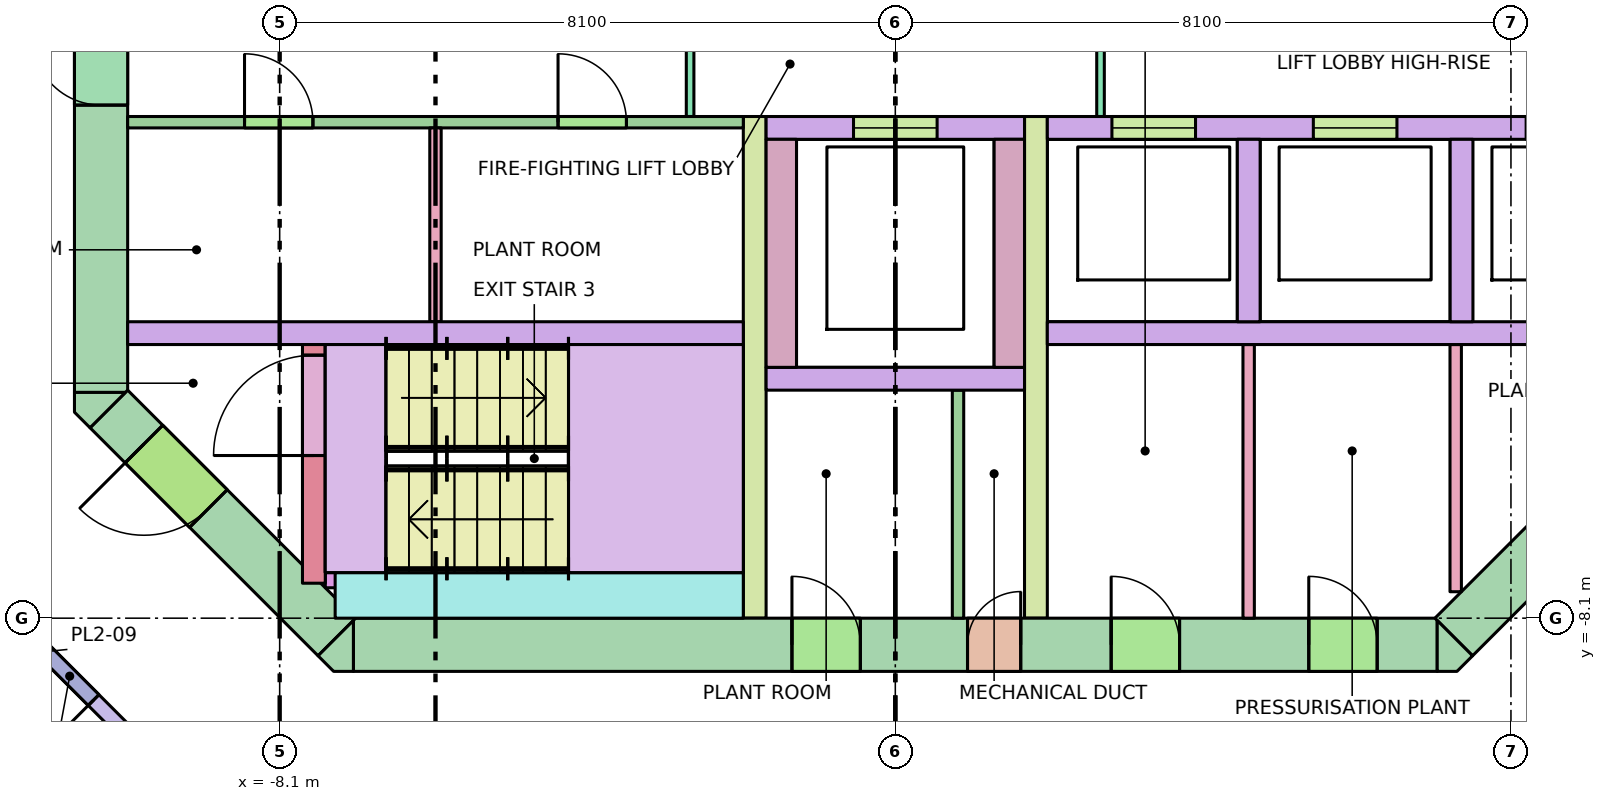
"""IFC4 building model, lengths in metres.
Left out: names, types, materials, properties, quantities, classifications, styles, units other than length and angle.
Written with IfcOpenShell. Run it as: python <this file> out.ifc"""

import sys

from ifc_helpers import new_model, si_unit, direction, frame, frame_2d, origin, place, context, subcontext, project, spatial, polyline, rectangle, outline, extrude, element, fill, save


model = new_model("IFC4")
c1 = context("Model", 3, precision=1e-05, world=origin(), true_north=direction((0.0, 1.0)))
c2 = subcontext(c1, "Body", "Model", "MODEL_VIEW")
j1 = project(units=[si_unit("LENGTHUNIT", "METRE"), si_unit("PLANEANGLEUNIT", "RADIAN")], contexts=[c1])
p1 = place(None, origin())
s1 = spatial("IfcSite", under=j1, at=p1, CompositionType="ELEMENT")
p2 = place(p1, origin())
s2 = spatial("IfcBuilding", under=s1, at=p2, CompositionType="ELEMENT")
p3 = place(p2, frame((0.0, 0.0, 183.8)))
s3 = spatial("IfcBuildingStorey", under=s2, at=p3, CompositionType="ELEMENT", Elevation=183.8)
p4 = place(p3, frame((-7.13, -8.45, -0.28), z_axis=(0.0, 0.0, 1.0), x_axis=(1.0, 0.0, 0.0)))
e1 = element("IfcWall", 1, at=p4, inside=s3, PredefinedType="SHEAR", context=c2, shape_type="SweptSolid", body=[
    extrude(rectangle(XDim=14.26, YDim=0.7, at=frame_2d((7.13, 0.0))), origin(), (0.0, 0.0, 1.0), 9.0),
])
p5 = place(p4, frame((8.08, 0.0, 0.28)))
e2 = element("IfcOpeningElement", 2, at=p5, cuts=e1, PredefinedType="OPENING", context=c2, shape_type="SweptSolid", body=[
    extrude(rectangle(XDim=0.7, YDim=2.1, at=frame_2d((0.35, 1.05))), frame((0.0, 0.36, 0.0), z_axis=(0.0, -1.0, 0.0), x_axis=(1.0, 0.0, 0.0)), (0.0, 0.0, 1.0), 0.72),
])
p6 = place(p4, frame((5.77, 0.0, 0.28)))
e3 = element("IfcOpeningElement", 3, at=p6, cuts=e1, PredefinedType="OPENING", context=c2, shape_type="SweptSolid", body=[
    extrude(rectangle(XDim=0.9, YDim=2.1, at=frame_2d((0.45, 1.05))), frame((0.0, 0.36, 0.0), z_axis=(0.0, -1.0, 0.0), x_axis=(1.0, 0.0, 0.0)), (0.0, 0.0, 1.0), 0.72),
])
p7 = place(p4, frame((9.97, 0.0, 0.28)))
e4 = element("IfcOpeningElement", 4, at=p7, cuts=e1, PredefinedType="OPENING", context=c2, shape_type="SweptSolid", body=[
    extrude(rectangle(XDim=0.9, YDim=2.1, at=frame_2d((0.45, 1.05))), frame((0.0, 0.36, 0.0), z_axis=(0.0, -1.0, 0.0), x_axis=(1.0, 0.0, 0.0)), (0.0, 0.0, 1.0), 0.72),
])
p8 = place(p4, frame((12.57, 0.0, 0.28)))
e5 = element("IfcOpeningElement", 5, at=p8, cuts=e1, PredefinedType="OPENING", context=c2, shape_type="SweptSolid", body=[
    extrude(rectangle(XDim=0.9, YDim=2.1, at=frame_2d((0.45, 1.05))), frame((0.0, 0.36, 0.0), z_axis=(0.0, -1.0, 0.0), x_axis=(1.0, 0.0, 0.0)), (0.0, 0.0, 1.0), 0.72),
])
p9 = place(p3, frame((-10.45, -5.13, -0.28), z_axis=(0.0, 0.0, 1.0), x_axis=(0.0, 1.0, 0.0)))
e6 = element("IfcWall", 6, at=p9, inside=s3, PredefinedType="SHEAR", context=c2, shape_type="SweptSolid", body=[
    extrude(rectangle(XDim=10.26, YDim=0.7, at=frame_2d((5.13, 0.0))), origin(), (0.0, 0.0, 1.0), 9.0),
])
p10 = place(p9, frame((5.58, 0.0, 0.28)))
e7 = element("IfcOpeningElement", 7, at=p10, cuts=e6, PredefinedType="OPENING", context=c2, shape_type="SweptSolid", body=[
    extrude(rectangle(XDim=0.9, YDim=2.1, at=frame_2d((0.45, 1.05))), frame((0.0, 0.36, 0.0), z_axis=(0.0, -1.0, 0.0), x_axis=(1.0, 0.0, 0.0)), (0.0, 0.0, 1.0), 0.72),
])
p11 = place(p9, frame((3.78, 0.0, 0.28)))
e8 = element("IfcOpeningElement", 8, at=p11, cuts=e6, PredefinedType="OPENING", context=c2, shape_type="SweptSolid", body=[
    extrude(rectangle(XDim=0.9, YDim=2.1, at=frame_2d((0.45, 1.05))), frame((0.0, 0.36, 0.0), z_axis=(0.0, -1.0, 0.0), x_axis=(1.0, 0.0, 0.0)), (0.0, 0.0, 1.0), 0.72),
])
p12 = place(p3, frame((10.347, -5.347, -0.28), z_axis=(0.0, 0.0, 1.0), x_axis=(-0.707106781187, -0.707106781187, 0.0)))
e9 = element("IfcWall", 9, at=p12, inside=s3, PredefinedType="SHEAR", context=c2, shape_type="SweptSolid", body=[
    extrude(rectangle(XDim=4.243, YDim=0.7, at=frame_2d((2.121, 0.0))), origin(), (0.0, 0.0, 1.0), 9.0),
])
p13 = place(p12, frame((0.52, 0.0, 0.28)))
e10 = element("IfcOpeningElement", 10, at=p13, cuts=e9, PredefinedType="OPENING", context=c2, shape_type="SweptSolid", body=[
    extrude(rectangle(XDim=0.9, YDim=2.1, at=frame_2d((0.45, 1.05))), frame((0.0, 0.36, 0.0), z_axis=(0.0, -1.0, 0.0), x_axis=(1.0, 0.0, 0.0)), (0.0, 0.0, 1.0), 0.72),
])
p14 = place(p3, frame((-7.347, -8.347, -0.28), z_axis=(0.0, 0.0, 1.0), x_axis=(-0.707106781187, 0.707106781187, 0.0)))
e11 = element("IfcWall", 11, at=p14, inside=s3, PredefinedType="SHEAR", context=c2, shape_type="SweptSolid", body=[
    extrude(rectangle(XDim=4.243, YDim=0.7, at=frame_2d((2.121, 0.0))), origin(), (0.0, 0.0, 1.0), 9.0),
])
p15 = place(p14, frame((2.39, 0.0, 0.28)))
e12 = element("IfcOpeningElement", 12, at=p15, cuts=e11, PredefinedType="OPENING", context=c2, shape_type="SweptSolid", body=[
    extrude(rectangle(XDim=1.2, YDim=2.1, at=frame_2d((0.6, 1.05))), frame((0.0, 0.36, 0.0), z_axis=(0.0, -1.0, 0.0), x_axis=(1.0, 0.0, 0.0)), (0.0, 0.0, 1.0), 0.72),
])
p16 = place(p3, frame((0.0, 0.0, -0.28)))
e13 = element("IfcWall", 13, at=p16, inside=s3, PredefinedType="SHEAR", context=c2, shape_type="SweptSolid", body=[
    extrude(outline(polyline([(-7.39, -8.8), (-7.595, -8.595), (-7.595, -8.595), (-7.595, -8.595), (-7.13, -8.13), (-7.13, -8.8), (-7.13, -8.8), (-7.39, -8.8)])), origin(), (0.0, 0.0, 1.0), 9.0),
])
p17 = place(p3, frame((0.0, 0.0, -0.28)))
e14 = element("IfcWall", 14, at=p17, inside=s3, PredefinedType="SHEAR", context=c2, shape_type="SweptSolid", body=[
    extrude(outline(polyline([(7.39, -8.8), (7.13, -8.8), (7.13, -8.8), (7.13, -8.13), (7.595, -8.595), (7.595, -8.595), (7.595, -8.595), (7.39, -8.8)])), origin(), (0.0, 0.0, 1.0), 9.0),
])
p18 = place(p3, frame((0.0, 0.0, -0.28)))
e15 = element("IfcWall", 15, at=p18, inside=s3, PredefinedType="SHEAR", context=c2, shape_type="SweptSolid", body=[
    extrude(outline(polyline([(-10.8, -5.39), (-10.8, -5.13), (-10.8, -5.13), (-10.13, -5.13), (-10.595, -5.595), (-10.595, -5.595), (-10.595, -5.595), (-10.8, -5.39)])), origin(), (0.0, 0.0, 1.0), 9.0),
])
for number, where, z_axis, x_axis in (
    (16, (-10.1, -4.35, 0.0), (0.0, 0.0, 1.0), (1.0, 0.0, 0.0)),
    (17, (2.0, -4.35, 0.0), (0.0, 0.0, 1.0), (1.0, 0.0, 0.0)),
):
    element("IfcWall", number, at=place(p3, frame(where, z_axis=z_axis, x_axis=x_axis)), inside=s3, PredefinedType="SOLIDWALL", context=c2, shape_type="SweptSolid", body=[
        extrude(rectangle(XDim=8.1, YDim=0.3, at=frame_2d((4.05, 0.0))), origin(), (0.0, 0.0, 1.0), 8.72),
    ])
p19 = place(p3, frame((2.0, -1.65, 0.0), z_axis=(0.0, 0.0, 1.0), x_axis=(1.0, 0.0, 0.0)))
e18 = element("IfcWall", 18, at=p19, inside=s3, PredefinedType="SOLIDWALL", context=c2, shape_type="SweptSolid", body=[
    extrude(rectangle(XDim=8.1, YDim=0.3, at=frame_2d((4.05, 0.0))), origin(), (0.0, 0.0, 1.0), 8.72),
])
p20 = place(p19, frame((0.85, 0.0, 0.0)))
e19 = element("IfcOpeningElement", 19, at=p20, cuts=e18, PredefinedType="OPENING", context=c2, shape_type="SweptSolid", body=[
    extrude(rectangle(XDim=1.1, YDim=2.1, at=frame_2d((0.55, 1.05))), frame((0.0, 0.16, 0.0), z_axis=(0.0, -1.0, 0.0), x_axis=(1.0, 0.0, 0.0)), (0.0, 0.0, 1.0), 0.32),
])
p21 = place(p19, frame((3.5, 0.0, 0.0)))
e20 = element("IfcOpeningElement", 20, at=p21, cuts=e18, PredefinedType="OPENING", context=c2, shape_type="SweptSolid", body=[
    extrude(rectangle(XDim=1.1, YDim=2.1, at=frame_2d((0.55, 1.05))), frame((0.0, 0.16, 0.0), z_axis=(0.0, -1.0, 0.0), x_axis=(1.0, 0.0, 0.0)), (0.0, 0.0, 1.0), 0.32),
])
p22 = place(p19, frame((6.3, 0.0, 0.0)))
e21 = element("IfcOpeningElement", 21, at=p22, cuts=e18, PredefinedType="OPENING", context=c2, shape_type="SweptSolid", body=[
    extrude(rectangle(XDim=1.1, YDim=2.1, at=frame_2d((0.55, 1.05))), frame((0.0, 0.16, 0.0), z_axis=(0.0, -1.0, 0.0), x_axis=(1.0, 0.0, 0.0)), (0.0, 0.0, 1.0), 0.32),
])
for number, where, z_axis, x_axis in (
    (22, (4.65, -4.2, 0.0), (0.0, 0.0, 1.0), (0.0, 1.0, 0.0)),
    (23, (7.45, -4.2, 0.0), (0.0, 0.0, 1.0), (0.0, 1.0, 0.0)),
):
    element("IfcWall", number, at=place(p3, frame(where, z_axis=z_axis, x_axis=x_axis)), inside=s3, PredefinedType="SOLIDWALL", context=c2, shape_type="SweptSolid", body=[
        extrude(rectangle(XDim=2.4, YDim=0.3, at=frame_2d((1.2, 0.0))), origin(), (0.0, 0.0, 1.0), 8.72),
    ])
for number, where, z_axis, x_axis in (
    (24, (-1.85, -8.1, 0.0), (0.0, 0.0, 1.0), (0.0, 1.0, 0.0)),
    (25, (1.85, -8.1, 0.0), (0.0, 0.0, 1.0), (0.0, 1.0, 0.0)),
):
    element("IfcWall", number, at=place(p3, frame(where, z_axis=z_axis, x_axis=x_axis)), inside=s3, PredefinedType="SHEAR", context=c2, shape_type="SweptSolid", body=[
        extrude(rectangle(XDim=6.6, YDim=0.3, at=frame_2d((3.3, 0.0))), origin(), (0.0, 0.0, 1.0), 8.72),
    ])
p23 = place(p3, frame((-1.7, -1.65, 0.0), z_axis=(0.0, 0.0, 1.0), x_axis=(1.0, 0.0, 0.0)))
e26 = element("IfcWall", 26, at=p23, inside=s3, PredefinedType="SOLIDWALL", context=c2, shape_type="SweptSolid", body=[
    extrude(rectangle(XDim=3.4, YDim=0.3, at=frame_2d((1.7, 0.0))), origin(), (0.0, 0.0, 1.0), 8.72),
])
p24 = place(p23, frame((1.15, 0.0, 0.0)))
e27 = element("IfcOpeningElement", 27, at=p24, cuts=e26, PredefinedType="OPENING", context=c2, shape_type="SweptSolid", body=[
    extrude(rectangle(XDim=1.1, YDim=2.1, at=frame_2d((0.55, 1.05))), frame((0.0, 0.16, 0.0), z_axis=(0.0, -1.0, 0.0), x_axis=(1.0, 0.0, 0.0)), (0.0, 0.0, 1.0), 0.32),
])
for number, where, z_axis, x_axis in (
    (28, (-1.5, -4.8, 0.0), (0.0, 0.0, 1.0), (0.0, 1.0, 0.0)),
    (29, (1.5, -4.8, 0.0), (0.0, 0.0, 1.0), (0.0, 1.0, 0.0)),
):
    element("IfcWall", number, at=place(p3, frame(where, z_axis=z_axis, x_axis=x_axis)), inside=s3, PredefinedType="SOLIDWALL", context=c2, shape_type="SweptSolid", body=[
        extrude(rectangle(XDim=3.0, YDim=0.4, at=frame_2d((1.5, 0.0))), origin(), (0.0, 0.0, 1.0), 8.72),
    ])
p25 = place(p3, frame((-1.7, -4.95, 0.0), z_axis=(0.0, 0.0, 1.0), x_axis=(1.0, 0.0, 0.0)))
e30 = element("IfcWall", 30, at=p25, inside=s3, PredefinedType="SOLIDWALL", context=c2, shape_type="SweptSolid", body=[
    extrude(rectangle(XDim=3.4, YDim=0.3, at=frame_2d((1.7, 0.0))), origin(), (0.0, 0.0, 1.0), 8.72),
])
p26 = place(p3, frame((-7.65, -7.64, 0.0), z_axis=(0.0, 0.0, 1.0), x_axis=(0.0, 1.0, 0.0)))
e31 = element("IfcWall", 31, at=p26, inside=s3, PredefinedType="SHEAR", context=c2, shape_type="SweptSolid", body=[
    extrude(rectangle(XDim=3.14, YDim=0.3, at=frame_2d((1.57, 0.0))), origin(), (0.0, 0.0, 1.0), 8.72),
])
p27 = place(p26, frame((1.68, 0.0, 0.0)))
e32 = element("IfcOpeningElement", 32, at=p27, cuts=e31, PredefinedType="OPENING", context=c2, shape_type="SweptSolid", body=[
    extrude(rectangle(XDim=1.32, YDim=2.1, at=frame_2d((0.66, 1.05))), frame((0.0, 0.16, 0.0), z_axis=(0.0, -1.0, 0.0), x_axis=(1.0, 0.0, 0.0)), (0.0, 0.0, 1.0), 0.32),
])
p28 = place(p3, frame((-7.5, -7.6, 0.0), z_axis=(0.0, 0.0, 1.0), x_axis=(1.0, 0.0, 0.0)))
e33 = element("IfcWall", 33, at=p28, inside=s3, PredefinedType="SHEAR", context=c2, shape_type="SweptSolid", body=[
    extrude(rectangle(XDim=0.6, YDim=0.2, at=frame_2d((0.3, 0.0))), origin(), (0.0, 0.0, 1.0), 8.72),
])
p29 = place(p3, frame((-7.37, -7.8, 0.0), z_axis=(0.0, 0.0, 1.0), x_axis=(1.0, 0.0, 0.0)))
e34 = element("IfcWall", 34, at=p29, inside=s3, PredefinedType="SHEAR", context=c2, shape_type="SweptSolid", body=[
    extrude(rectangle(XDim=5.37, YDim=0.6, at=frame_2d((2.685, 0.0))), origin(), (0.0, 0.0, 1.0), 8.72),
])
p30 = place(p3, frame((-2.7, -1.5, 0.0), z_axis=(0.0, 0.0, 1.0), x_axis=(0.0, 1.0, 0.0)))
e35 = element("IfcWall", 35, at=p30, inside=s3, PredefinedType="PARTITIONING", context=c2, shape_type="SweptSolid", body=[
    extrude(rectangle(XDim=3.0, YDim=0.1, at=frame_2d((1.5, 0.0))), origin(), (0.0, 0.0, 1.0), 8.72),
])
p31 = place(p30, frame((0.9, 0.0, 0.0)))
e36 = element("IfcOpeningElement", 36, at=p31, cuts=e35, PredefinedType="OPENING", context=c2, shape_type="SweptSolid", body=[
    extrude(rectangle(XDim=1.2, YDim=2.1, at=frame_2d((0.6, 1.05))), frame((0.0, 0.06, 0.0), z_axis=(0.0, -1.0, 0.0), x_axis=(1.0, 0.0, 0.0)), (0.0, 0.0, 1.0), 0.12),
])
p32 = place(p3, frame((2.7, -1.5, 0.0), z_axis=(0.0, 0.0, 1.0), x_axis=(0.0, 1.0, 0.0)))
e37 = element("IfcWall", 37, at=p32, inside=s3, PredefinedType="PARTITIONING", context=c2, shape_type="SweptSolid", body=[
    extrude(rectangle(XDim=3.0, YDim=0.1, at=frame_2d((1.5, 0.0))), origin(), (0.0, 0.0, 1.0), 8.72),
])
p33 = place(p32, frame((0.9, 0.0, 0.0)))
e38 = element("IfcOpeningElement", 38, at=p33, cuts=e37, PredefinedType="OPENING", context=c2, shape_type="SweptSolid", body=[
    extrude(rectangle(XDim=1.2, YDim=2.1, at=frame_2d((0.6, 1.05))), frame((0.0, 0.06, 0.0), z_axis=(0.0, -1.0, 0.0), x_axis=(1.0, 0.0, 0.0)), (0.0, 0.0, 1.0), 0.12),
])
p34 = place(p3, frame((0.825, -8.1, 0.0), z_axis=(0.0, 0.0, 1.0), x_axis=(0.0, 1.0, 0.0)))
e39 = element("IfcWall", 39, at=p34, inside=s3, PredefinedType="PARTITIONING", context=c2, shape_type="SweptSolid", body=[
    extrude(rectangle(XDim=3.0, YDim=0.15, at=frame_2d((1.5, 0.0))), origin(), (0.0, 0.0, 1.0), 8.72),
])
p35 = place(p3, frame((4.649, -8.1, 0.0), z_axis=(0.0, 0.0, 1.0), x_axis=(0.0, 1.0, 0.0)))
e40 = element("IfcWall", 40, at=p35, inside=s3, PredefinedType="PARTITIONING", context=c2, shape_type="SweptSolid", body=[
    extrude(rectangle(XDim=3.6, YDim=0.15, at=frame_2d((1.8, 0.0))), origin(), (0.0, 0.0, 1.0), 8.72),
])
p36 = place(p3, frame((7.373, -7.752, 0.0), z_axis=(0.0, 0.0, 1.0), x_axis=(0.0, 1.0, 0.0)))
e41 = element("IfcWall", 41, at=p36, inside=s3, PredefinedType="PARTITIONING", context=c2, shape_type="SweptSolid", body=[
    extrude(rectangle(XDim=3.252, YDim=0.15, at=frame_2d((1.626, 0.0))), origin(), (0.0, 0.0, 1.0), 8.72),
])
p37 = place(p3, frame((-6.05, -4.2, 0.0), z_axis=(0.0, 0.0, 1.0), x_axis=(0.0, 1.0, 0.0)))
e42 = element("IfcWall", 42, at=p37, inside=s3, PredefinedType="PARTITIONING", context=c2, shape_type="SweptSolid", body=[
    extrude(rectangle(XDim=2.55, YDim=0.15, at=frame_2d((1.275, 0.0))), origin(), (0.0, 0.0, 1.0), 8.72),
])
p38 = place(p3, frame((-10.1, -1.575, 0.0), z_axis=(0.0, 0.0, 1.0), x_axis=(1.0, 0.0, 0.0)))
e43 = element("IfcWall", 43, at=p38, inside=s3, PredefinedType="PARTITIONING", context=c2, shape_type="SweptSolid", body=[
    extrude(rectangle(XDim=8.1, YDim=0.15, at=frame_2d((4.05, 0.0))), origin(), (0.0, 0.0, 1.0), 8.72),
])
p39 = place(p38, frame((1.538, 0.0, 0.0)))
e44 = element("IfcOpeningElement", 44, at=p39, cuts=e43, PredefinedType="OPENING", context=c2, shape_type="SweptSolid", body=[
    extrude(rectangle(XDim=0.9, YDim=2.1, at=frame_2d((0.45, 1.05))), frame((0.0, 0.085, 0.0), z_axis=(0.0, -1.0, 0.0), x_axis=(1.0, 0.0, 0.0)), (0.0, 0.0, 1.0), 0.17),
])
p40 = place(p38, frame((5.663, 0.0, 0.0)))
e45 = element("IfcOpeningElement", 45, at=p40, cuts=e43, PredefinedType="OPENING", context=c2, shape_type="SweptSolid", body=[
    extrude(rectangle(XDim=0.9, YDim=2.1, at=frame_2d((0.45, 1.05))), frame((0.0, 0.085, 0.0), z_axis=(0.0, -1.0, 0.0), x_axis=(1.0, 0.0, 0.0)), (0.0, 0.0, 1.0), 0.17),
])
p41 = place(p3, frame((-8.475, -11.25, 0.0), z_axis=(0.0, 0.0, 1.0), x_axis=(-0.707106781187, 0.707106781187, 0.0)))
e46 = element("IfcWall", 46, at=p41, inside=s3, PredefinedType="PARTITIONING", context=c2, shape_type="SweptSolid", body=[
    extrude(rectangle(XDim=6.753, YDim=0.2, at=frame_2d((3.377, 0.0))), origin(), (0.0, 0.0, 1.0), 7.92),
])
p42 = place(p41, frame((2.932, 0.0, 0.0)))
e47 = element("IfcOpeningElement", 47, at=p42, cuts=e46, PredefinedType="OPENING", context=c2, shape_type="SweptSolid", body=[
    extrude(rectangle(XDim=1.8, YDim=2.1, at=frame_2d((0.9, 1.05))), frame((0.0, 0.11, 0.0), z_axis=(0.0, -1.0, 0.0), x_axis=(1.0, 0.0, 0.0)), (0.0, 0.0, 1.0), 0.22),
])
p43 = place(p20, origin())
e48 = element("IfcDoor", 48, at=p43, inside=s3, OperationType="DOUBLE_DOOR_SLIDING", PredefinedType="DOOR", context=c2, shape_type="SweptSolid", body=[
    extrude(rectangle(XDim=1.1, YDim=2.1, at=frame_2d((0.55, 1.05))), frame((0.0, 0.025, 0.0), z_axis=(0.0, -1.0, 0.0), x_axis=(1.0, 0.0, 0.0)), (0.0, 0.0, 1.0), 0.05),
])
fill(e19, e48)
p44 = place(p21, origin())
e49 = element("IfcDoor", 49, at=p44, inside=s3, OperationType="DOUBLE_DOOR_SLIDING", PredefinedType="DOOR", context=c2, shape_type="SweptSolid", body=[
    extrude(rectangle(XDim=1.1, YDim=2.1, at=frame_2d((0.55, 1.05))), frame((0.0, 0.025, 0.0), z_axis=(0.0, -1.0, 0.0), x_axis=(1.0, 0.0, 0.0)), (0.0, 0.0, 1.0), 0.05),
])
fill(e20, e49)
p45 = place(p24, origin())
e50 = element("IfcDoor", 50, at=p45, inside=s3, OperationType="DOUBLE_DOOR_SLIDING", PredefinedType="DOOR", context=c2, shape_type="SweptSolid", body=[
    extrude(rectangle(XDim=1.1, YDim=2.1, at=frame_2d((0.55, 1.05))), frame((0.0, 0.025, 0.0), z_axis=(0.0, -1.0, 0.0), x_axis=(1.0, 0.0, 0.0)), (0.0, 0.0, 1.0), 0.05),
])
fill(e27, e50)
p46 = place(p27, origin())
e51 = element("IfcDoor", 51, at=p46, inside=s3, OperationType="DOUBLE_DOOR_SINGLE_SWING", PredefinedType="DOOR", context=c2, shape_type="SweptSolid", body=[
    extrude(rectangle(XDim=1.32, YDim=2.1, at=frame_2d((0.66, 1.05))), frame((0.0, 0.025, 0.0), z_axis=(0.0, -1.0, 0.0), x_axis=(1.0, 0.0, 0.0)), (0.0, 0.0, 1.0), 0.05),
])
fill(e32, e51)
p47 = place(p15, origin())
e52 = element("IfcDoor", 52, at=p47, inside=s3, OperationType="SINGLE_SWING_RIGHT", PredefinedType="DOOR", context=c2, shape_type="SweptSolid", body=[
    extrude(rectangle(XDim=1.2, YDim=2.1, at=frame_2d((0.6, 1.05))), frame((0.0, 0.025, 0.0), z_axis=(0.0, -1.0, 0.0), x_axis=(1.0, 0.0, 0.0)), (0.0, 0.0, 1.0), 0.05),
])
fill(e12, e52)
p48 = place(p11, origin())
e53 = element("IfcDoor", 53, at=p48, inside=s3, OperationType="SINGLE_SWING_RIGHT", PredefinedType="DOOR", context=c2, shape_type="SweptSolid", body=[
    extrude(rectangle(XDim=0.9, YDim=2.1, at=frame_2d((0.45, 1.05))), frame((0.0, 0.025, 0.0), z_axis=(0.0, -1.0, 0.0), x_axis=(1.0, 0.0, 0.0)), (0.0, 0.0, 1.0), 0.05),
])
fill(e8, e53)
p49 = place(p5, origin())
e54 = element("IfcDoor", 54, at=p49, inside=s3, OperationType="SINGLE_SWING_RIGHT", PredefinedType="DOOR", context=c2, shape_type="SweptSolid", body=[
    extrude(rectangle(XDim=0.7, YDim=2.1, at=frame_2d((0.35, 1.05))), frame((0.0, 0.025, 0.0), z_axis=(0.0, -1.0, 0.0), x_axis=(1.0, 0.0, 0.0)), (0.0, 0.0, 1.0), 0.05),
])
fill(e2, e54)
p50 = place(p6, origin())
e55 = element("IfcDoor", 55, at=p50, inside=s3, OperationType="SINGLE_SWING_LEFT", PredefinedType="DOOR", context=c2, shape_type="SweptSolid", body=[
    extrude(rectangle(XDim=0.9, YDim=2.1, at=frame_2d((0.45, 1.05))), frame((0.0, 0.025, 0.0), z_axis=(0.0, -1.0, 0.0), x_axis=(1.0, 0.0, 0.0)), (0.0, 0.0, 1.0), 0.05),
])
fill(e3, e55)
p51 = place(p7, origin())
e56 = element("IfcDoor", 56, at=p51, inside=s3, OperationType="SINGLE_SWING_LEFT", PredefinedType="DOOR", context=c2, shape_type="SweptSolid", body=[
    extrude(rectangle(XDim=0.9, YDim=2.1, at=frame_2d((0.45, 1.05))), frame((0.0, 0.025, 0.0), z_axis=(0.0, -1.0, 0.0), x_axis=(1.0, 0.0, 0.0)), (0.0, 0.0, 1.0), 0.05),
])
fill(e4, e56)
p52 = place(p8, origin())
e57 = element("IfcDoor", 57, at=p52, inside=s3, OperationType="SINGLE_SWING_LEFT", PredefinedType="DOOR", context=c2, shape_type="SweptSolid", body=[
    extrude(rectangle(XDim=0.9, YDim=2.1, at=frame_2d((0.45, 1.05))), frame((0.0, 0.025, 0.0), z_axis=(0.0, -1.0, 0.0), x_axis=(1.0, 0.0, 0.0)), (0.0, 0.0, 1.0), 0.05),
])
fill(e5, e57)
p53 = place(p39, origin())
e58 = element("IfcDoor", 58, at=p53, inside=s3, OperationType="SINGLE_SWING_LEFT", PredefinedType="DOOR", context=c2, shape_type="SweptSolid", body=[
    extrude(rectangle(XDim=0.9, YDim=2.1, at=frame_2d((0.45, 1.05))), frame((0.0, 0.025, 0.0), z_axis=(0.0, -1.0, 0.0), x_axis=(1.0, 0.0, 0.0)), (0.0, 0.0, 1.0), 0.05),
])
fill(e44, e58)
p54 = place(p40, origin())
e59 = element("IfcDoor", 59, at=p54, inside=s3, OperationType="SINGLE_SWING_LEFT", PredefinedType="DOOR", context=c2, shape_type="SweptSolid", body=[
    extrude(rectangle(XDim=0.9, YDim=2.1, at=frame_2d((0.45, 1.05))), frame((0.0, 0.025, 0.0), z_axis=(0.0, -1.0, 0.0), x_axis=(1.0, 0.0, 0.0)), (0.0, 0.0, 1.0), 0.05),
])
fill(e45, e59)
p55 = place(p42, origin())
e60 = element("IfcDoor", 60, at=p55, inside=s3, OperationType="DOUBLE_DOOR_SINGLE_SWING", PredefinedType="DOOR", context=c2, shape_type="SweptSolid", body=[
    extrude(rectangle(XDim=1.8, YDim=2.1, at=frame_2d((0.9, 1.05))), frame((0.0, 0.025, 0.0), z_axis=(0.0, -1.0, 0.0), x_axis=(1.0, 0.0, 0.0)), (0.0, 0.0, 1.0), 0.05),
])
fill(e47, e60)
save(model, sys.argv[1])
